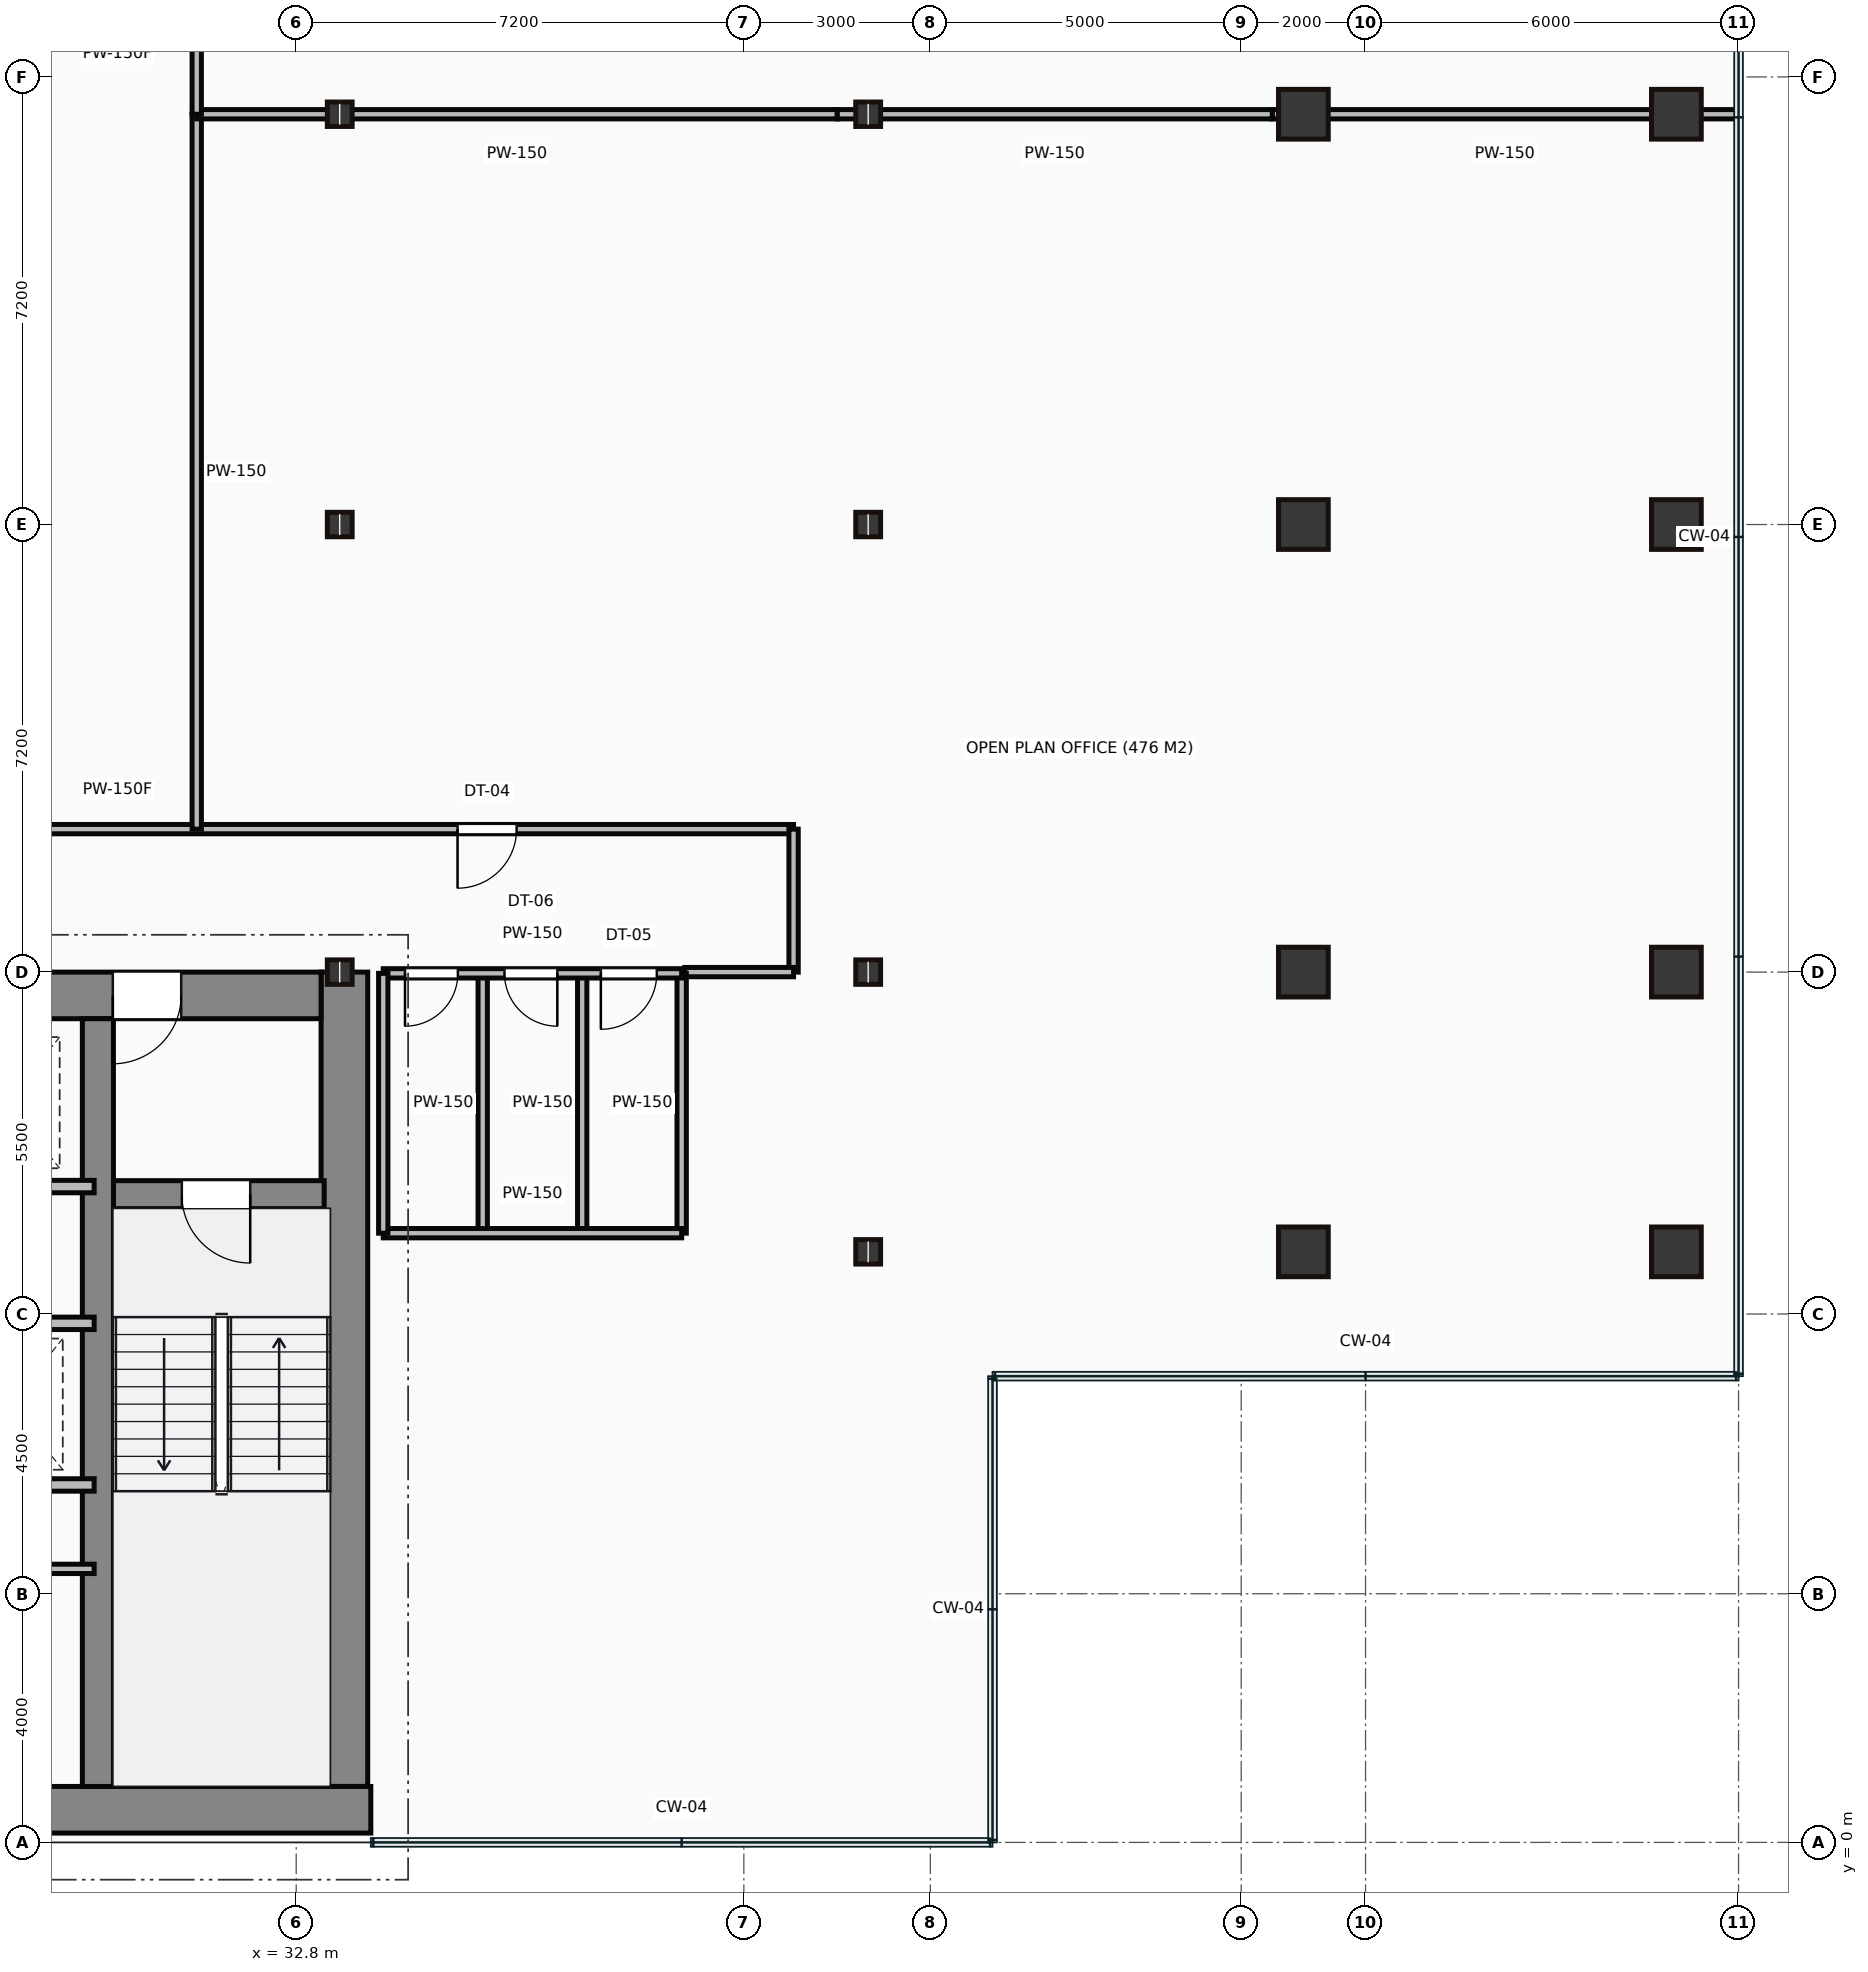
"""IFC4 building model, lengths in metres.
Left out: names, types, materials, properties, quantities, classifications, styles, units other than length and angle.
Written with IfcOpenShell. Run it as: python <this file> out.ifc"""

import sys

from ifc_helpers import new_model, si_unit, direction, frame, frame_2d, origin, origin_2d, place, context, subcontext, project, spatial, rectangle, hollow_rectangle, i_section, extrude, source, transform, mapped, element, fill, save


model = new_model("IFC4")
c1 = context("Model", 3, precision=1e-05, world=origin(), true_north=direction((0.0, 1.0)))
c2 = subcontext(c1, "Body", "Model", "MODEL_VIEW")
j1 = project(units=[si_unit("LENGTHUNIT", "METRE"), si_unit("PLANEANGLEUNIT", "RADIAN")], contexts=[c1])
p1 = place(None, origin())
s1 = spatial("IfcSite", under=j1, at=p1, CompositionType="ELEMENT")
p2 = place(p1, origin())
s2 = spatial("IfcBuilding", under=s1, at=p2, CompositionType="ELEMENT")
p3 = place(p2, frame((0.0, 0.0, 92.3)))
s3 = spatial("IfcBuildingStorey", under=s2, at=p3, CompositionType="ELEMENT", Elevation=92.3)
m1 = source(origin(), c2, "Body", "SweptSolid", [
    extrude(rectangle(XDim=29.5, YDim=0.75, at=frame_2d((14.75, 0.0))), origin(), (0.0, 0.0, 1.0), 3.65),
])
p4 = place(p3, frame((4.5, 0.525, 0.0), z_axis=(0.0, 0.0, 1.0), x_axis=(1.0, 0.0, 0.0)))
e1 = element("IfcWall", 1, at=p4, inside=s3, PredefinedType="SHEAR", context=c2, shape_type="MappedRepresentation", body=[
    mapped(m1, transform((0.0, 0.0, 0.0))),
])
m2 = source(origin(), c2, "Body", "SweptSolid", [
    extrude(rectangle(XDim=13.1, YDim=0.75, at=frame_2d((6.55, 0.0))), origin(), (0.0, 0.0, 1.0), 3.65),
])
p5 = place(p3, frame((33.575, 0.9, 0.0), z_axis=(0.0, 0.0, 1.0), x_axis=(0.0, 1.0, 0.0)))
e2 = element("IfcWall", 2, at=p5, inside=s3, PredefinedType="SHEAR", context=c2, shape_type="MappedRepresentation", body=[
    mapped(m2, transform((0.0, 0.0, 0.0))),
])
m3 = source(origin(), c2, "Body", "SweptSolid", [
    extrude(rectangle(XDim=12.6, YDim=0.75, at=frame_2d((6.3, 0.0))), origin(), (0.0, 0.0, 1.0), 3.65),
])
p6 = place(p3, frame((20.6, 13.625, 0.0), z_axis=(0.0, 0.0, 1.0), x_axis=(1.0, 0.0, 0.0)))
e3 = element("IfcWall", 3, at=p6, inside=s3, PredefinedType="SHEAR", context=c2, shape_type="MappedRepresentation", body=[
    mapped(m3, transform((0.0, 0.0, 0.0))),
])
p7 = place(p6, frame((9.25, 0.0, 0.0)))
e4 = element("IfcOpeningElement", 4, at=p7, cuts=e3, PredefinedType="OPENING", context=c2, shape_type="SweptSolid", body=[
    extrude(rectangle(XDim=1.1, YDim=2.15, at=frame_2d((0.55, 1.075))), frame((0.0, 0.385, 0.0), z_axis=(0.0, -1.0, 0.0), x_axis=(1.0, 0.0, 0.0)), (0.0, 0.0, 1.0), 0.77),
])
m4 = source(origin(), c2, "Body", "SweptSolid", [
    extrude(rectangle(XDim=12.35, YDim=0.5, at=frame_2d((6.175, 0.0))), origin(), (0.0, 0.0, 1.0), 3.65),
])
p8 = place(p3, frame((29.61, 0.9, 0.0), z_axis=(0.0, 0.0, 1.0), x_axis=(0.0, 1.0, 0.0)))
e5 = element("IfcWall", 5, at=p8, inside=s3, PredefinedType="SHEAR", context=c2, shape_type="MappedRepresentation", body=[
    mapped(m4, transform((0.0, 0.0, 0.0))),
])
m5 = source(origin(), c2, "Body", "SweptSolid", [
    extrude(rectangle(XDim=3.39, YDim=0.45, at=frame_2d((1.695, 0.0))), origin(), (0.0, 0.0, 1.0), 3.65),
])
p9 = place(p3, frame((29.86, 10.42, 0.0), z_axis=(0.0, 0.0, 1.0), x_axis=(1.0, 0.0, 0.0)))
e6 = element("IfcWall", 6, at=p9, inside=s3, PredefinedType="SHEAR", context=c2, shape_type="MappedRepresentation", body=[
    mapped(m5, transform((0.0, 0.0, 0.0))),
])
p10 = place(p9, frame((1.1, 0.0, 0.0)))
e7 = element("IfcOpeningElement", 7, at=p10, cuts=e6, PredefinedType="OPENING", context=c2, shape_type="SweptSolid", body=[
    extrude(rectangle(XDim=1.1, YDim=2.15, at=frame_2d((0.55, 1.075))), frame((0.0, 0.235, 0.0), z_axis=(0.0, -1.0, 0.0), x_axis=(1.0, 0.0, 0.0)), (0.0, 0.0, 1.0), 0.47),
])
m6 = source(origin(), c2, "Body", "SweptSolid", [
    extrude(i_section(OverallWidth=0.399, OverallDepth=0.393, WebThickness=0.023, FlangeThickness=0.037, at=origin_2d()), origin(), (0.0, 0.0, 1.0), 3.65),
])
for number, where, z_axis, x_axis in (
    (8, (33.5, 14.0, 0.0), (0.0, 0.0, 1.0), (1.0, 0.0, 0.0)),
    (9, (33.5, 21.2, 0.0), (0.0, 0.0, 1.0), (1.0, 0.0, 0.0)),
    (10, (33.5, 27.8, 0.0), (0.0, 0.0, 1.0), (1.0, 0.0, 0.0)),
    (11, (42.0, 9.5, 0.0), (0.0, 0.0, 1.0), (1.0, 0.0, 0.0)),
    (12, (42.0, 14.0, 0.0), (0.0, 0.0, 1.0), (1.0, 0.0, 0.0)),
    (13, (42.0, 21.2, 0.0), (0.0, 0.0, 1.0), (1.0, 0.0, 0.0)),
    (14, (42.0, 27.8, 0.0), (0.0, 0.0, 1.0), (1.0, 0.0, 0.0)),
):
    element("IfcColumn", number, at=place(p3, frame(where, z_axis=z_axis, x_axis=x_axis)), inside=s3, PredefinedType="COLUMN", context=c2, shape_type="MappedRepresentation", body=[
        mapped(m6, transform((0.0, 0.0, 0.0))),
    ])
m7 = source(origin(), c2, "Body", "SweptSolid", [
    extrude(hollow_rectangle(XDim=0.8, YDim=0.8, WallThickness=0.04, at=origin_2d()), origin(), (0.0, 0.0, 1.0), 3.65),
])
for number, where, z_axis, x_axis in (
    (15, (49.0, 9.5, 0.0), (0.0, 0.0, 1.0), (1.0, 0.0, 0.0)),
    (16, (49.0, 14.0, 0.0), (0.0, 0.0, 1.0), (1.0, 0.0, 0.0)),
    (17, (49.0, 21.2, 0.0), (0.0, 0.0, 1.0), (1.0, 0.0, 0.0)),
    (18, (49.0, 27.8, 0.0), (0.0, 0.0, 1.0), (1.0, 0.0, 0.0)),
    (19, (55.0, 9.5, 0.0), (0.0, 0.0, 1.0), (1.0, 0.0, 0.0)),
    (20, (55.0, 14.0, 0.0), (0.0, 0.0, 1.0), (1.0, 0.0, 0.0)),
    (21, (55.0, 21.2, 0.0), (0.0, 0.0, 1.0), (1.0, 0.0, 0.0)),
    (22, (55.0, 27.8, 0.0), (0.0, 0.0, 1.0), (1.0, 0.0, 0.0)),
):
    element("IfcColumn", number, at=place(p3, frame(where, z_axis=z_axis, x_axis=x_axis)), inside=s3, PredefinedType="COLUMN", context=c2, shape_type="MappedRepresentation", body=[
        mapped(m7, transform((0.0, 0.0, 0.0))),
    ])
m8 = source(origin(), c2, "Body", "SweptSolid", [
    extrude(rectangle(XDim=8.8, YDim=0.2, at=frame_2d((4.4, 0.0))), origin(), (0.0, 0.0, 1.0), 3.4),
])
p11 = place(p3, frame((20.75, 10.55, 0.0), z_axis=(0.0, 0.0, 1.0), x_axis=(1.0, 0.0, 0.0)))
e23 = element("IfcWall", 23, at=p11, inside=s3, PredefinedType="PARTITIONING", context=c2, shape_type="MappedRepresentation", body=[
    mapped(m8, transform((0.0, 0.0, 0.0))),
])
m9 = source(origin(), c2, "Body", "SweptSolid", [
    extrude(rectangle(XDim=4.55, YDim=0.2, at=frame_2d((2.275, 0.0))), origin(), (0.0, 0.0, 1.0), 3.4),
])
for number, where, z_axis, x_axis in (
    (24, (25.0, 8.35, 0.0), (0.0, 0.0, 1.0), (1.0, 0.0, 0.0)),
    (25, (25.0, 5.75, 0.0), (0.0, 0.0, 1.0), (1.0, 0.0, 0.0)),
):
    element("IfcWall", number, at=place(p3, frame(where, z_axis=z_axis, x_axis=x_axis)), inside=s3, PredefinedType="PARTITIONING", context=c2, shape_type="MappedRepresentation", body=[
        mapped(m9, transform((0.0, 0.0, 0.0))),
    ])
m10 = source(origin(), c2, "Body", "SweptSolid", [
    extrude(rectangle(XDim=4.55, YDim=0.15, at=frame_2d((2.275, 0.0))), origin(), (0.0, 0.0, 1.0), 3.4),
])
p12 = place(p3, frame((25.0, 4.4, 0.0), z_axis=(0.0, 0.0, 1.0), x_axis=(1.0, 0.0, 0.0)))
e26 = element("IfcWall", 26, at=p12, inside=s3, PredefinedType="PARTITIONING", context=c2, shape_type="MappedRepresentation", body=[
    mapped(m10, transform((0.0, 0.0, 0.0))),
])
m11 = source(origin(), c2, "Body", "SweptSolid", [
    extrude(rectangle(XDim=4.8, YDim=0.15, at=frame_2d((2.4, 0.0))), origin(), (0.0, 0.0, 1.0), 2.702),
])
p13 = place(p3, frame((34.2, 13.98, 0.0), z_axis=(0.0, 0.0, 1.0), x_axis=(1.0, 0.0, 0.0)))
e27 = element("IfcWall", 27, at=p13, inside=s3, PredefinedType="PARTITIONING", context=c2, shape_type="MappedRepresentation", body=[
    mapped(m11, transform((0.0, 0.0, 0.0))),
])
p14 = place(p13, frame((0.35, 0.0, 0.0)))
e28 = element("IfcOpeningElement", 28, at=p14, cuts=e27, PredefinedType="OPENING", context=c2, shape_type="SweptSolid", body=[
    extrude(rectangle(XDim=0.85, YDim=2.1, at=frame_2d((0.425, 1.05))), frame((0.0, 0.085, 0.0), z_axis=(0.0, -1.0, 0.0), x_axis=(1.0, 0.0, 0.0)), (0.0, 0.0, 1.0), 0.17),
])
p15 = place(p13, frame((1.95, 0.0, 0.0)))
e29 = element("IfcOpeningElement", 29, at=p15, cuts=e27, PredefinedType="OPENING", context=c2, shape_type="SweptSolid", body=[
    extrude(rectangle(XDim=0.85, YDim=2.1, at=frame_2d((0.425, 1.05))), frame((0.0, 0.085, 0.0), z_axis=(0.0, -1.0, 0.0), x_axis=(1.0, 0.0, 0.0)), (0.0, 0.0, 1.0), 0.17),
])
p16 = place(p13, frame((3.5, 0.0, 0.0)))
e30 = element("IfcOpeningElement", 30, at=p16, cuts=e27, PredefinedType="OPENING", context=c2, shape_type="SweptSolid", body=[
    extrude(rectangle(XDim=0.9, YDim=2.1, at=frame_2d((0.45, 1.05))), frame((0.0, 0.085, 0.0), z_axis=(0.0, -1.0, 0.0), x_axis=(1.0, 0.0, 0.0)), (0.0, 0.0, 1.0), 0.17),
])
m12 = source(origin(), c2, "Body", "SweptSolid", [
    extrude(rectangle(XDim=4.8, YDim=0.15, at=frame_2d((2.4, 0.0))), origin(), (0.0, 0.0, 1.0), 3.4),
])
p17 = place(p3, frame((34.2, 9.8, 0.0), z_axis=(0.0, 0.0, 1.0), x_axis=(1.0, 0.0, 0.0)))
e31 = element("IfcWall", 31, at=p17, inside=s3, PredefinedType="PARTITIONING", context=c2, shape_type="MappedRepresentation", body=[
    mapped(m12, transform((0.0, 0.0, 0.0))),
])
m13 = source(origin(), c2, "Body", "SweptSolid", [
    extrude(rectangle(XDim=4.18, YDim=0.15, at=frame_2d((2.09, 0.0))), origin(), (0.0, 0.0, 1.0), 3.4),
])
for number, where, z_axis, x_axis in (
    (32, (39.0, 9.8, 0.0), (0.0, 0.0, 1.0), (0.0, 1.0, 0.0)),
    (33, (34.2, 9.8, 0.0), (0.0, 0.0, 1.0), (0.0, 1.0, 0.0)),
    (34, (35.8, 9.8, 0.0), (0.0, 0.0, 1.0), (0.0, 1.0, 0.0)),
    (35, (37.4, 9.8, 0.0), (0.0, 0.0, 1.0), (0.0, 1.0, 0.0)),
):
    element("IfcWall", number, at=place(p3, frame(where, z_axis=z_axis, x_axis=x_axis)), inside=s3, PredefinedType="PARTITIONING", context=c2, shape_type="MappedRepresentation", body=[
        mapped(m13, transform((0.0, 0.0, 0.0))),
    ])
m14 = source(origin(), c2, "Body", "SweptSolid", [
    extrude(rectangle(XDim=21.75, YDim=0.15, at=frame_2d((10.875, 0.0))), origin(), (0.0, 0.0, 1.0), 3.4),
])
p18 = place(p3, frame((19.05, 16.3, 0.0), z_axis=(0.0, 0.0, 1.0), x_axis=(1.0, 0.0, 0.0)))
e36 = element("IfcWall", 36, at=p18, inside=s3, PredefinedType="PARTITIONING", context=c2, shape_type="MappedRepresentation", body=[
    mapped(m14, transform((0.0, 0.0, 0.0))),
])
p19 = place(p18, frame((16.345, 0.0, 0.0)))
e37 = element("IfcOpeningElement", 37, at=p19, cuts=e36, PredefinedType="OPENING", context=c2, shape_type="SweptSolid", body=[
    extrude(rectangle(XDim=0.95, YDim=2.15, at=frame_2d((0.475, 1.075))), frame((0.0, 0.085, 0.0), z_axis=(0.0, -1.0, 0.0), x_axis=(1.0, 0.0, 0.0)), (0.0, 0.0, 1.0), 0.17),
])
m15 = source(origin(), c2, "Body", "SweptSolid", [
    extrude(rectangle(XDim=2.3, YDim=0.15, at=frame_2d((1.15, 0.0))), origin(), (0.0, 0.0, 1.0), 3.4),
])
p20 = place(p3, frame((40.8, 16.3, 0.0), z_axis=(0.0, 0.0, 1.0), x_axis=(0.0, -1.0, 0.0)))
e38 = element("IfcWall", 38, at=p20, inside=s3, PredefinedType="PARTITIONING", context=c2, shape_type="MappedRepresentation", body=[
    mapped(m15, transform((0.0, 0.0, 0.0))),
])
m16 = source(origin(), c2, "Body", "SweptSolid", [
    extrude(rectangle(XDim=1.75, YDim=0.15, at=frame_2d((0.875, 0.0))), origin(), (0.0, 0.0, 1.0), 2.702),
])
p21 = place(p3, frame((40.8, 14.0, 0.0), z_axis=(0.0, 0.0, 1.0), x_axis=(-1.0, 0.0, 0.0)))
e39 = element("IfcWall", 39, at=p21, inside=s3, PredefinedType="PARTITIONING", context=c2, shape_type="MappedRepresentation", body=[
    mapped(m16, transform((0.0, 0.0, 0.0))),
])
m17 = source(origin(), c2, "Body", "SweptSolid", [
    extrude(rectangle(XDim=11.5, YDim=0.15, at=frame_2d((5.75, 0.0))), origin(), (0.0, 0.0, 1.0), 3.4),
])
p22 = place(p3, frame((31.2, 27.8, 0.0), z_axis=(0.0, 0.0, 1.0), x_axis=(0.0, -1.0, 0.0)))
e40 = element("IfcWall", 40, at=p22, inside=s3, PredefinedType="PARTITIONING", context=c2, shape_type="MappedRepresentation", body=[
    mapped(m17, transform((0.0, 0.0, 0.0))),
])
m18 = source(origin(), c2, "Body", "SweptSolid", [
    extrude(rectangle(XDim=7.48, YDim=0.15, at=frame_2d((3.74, 0.0))), origin(), (0.0, 0.0, 1.0), 2.702),
])
p23 = place(p3, frame((55.98, 27.8, 0.0), z_axis=(0.0, 0.0, 1.0), x_axis=(-1.0, 0.0, 0.0)))
e41 = element("IfcWall", 41, at=p23, inside=s3, PredefinedType="PARTITIONING", context=c2, shape_type="MappedRepresentation", body=[
    mapped(m18, transform((0.0, 0.0, 0.0))),
])
m19 = source(origin(), c2, "Body", "SweptSolid", [
    extrude(rectangle(XDim=7.0, YDim=0.15, at=frame_2d((3.5, 0.0))), origin(), (0.0, 0.0, 1.0), 2.702),
])
p24 = place(p3, frame((48.5, 27.8, 0.0), z_axis=(0.0, 0.0, 1.0), x_axis=(-1.0, 0.0, 0.0)))
e42 = element("IfcWall", 42, at=p24, inside=s3, PredefinedType="PARTITIONING", context=c2, shape_type="MappedRepresentation", body=[
    mapped(m19, transform((0.0, 0.0, 0.0))),
])
m20 = source(origin(), c2, "Body", "SweptSolid", [
    extrude(rectangle(XDim=10.3, YDim=0.15, at=frame_2d((5.15, 0.0))), origin(), (0.0, 0.0, 1.0), 2.702),
])
p25 = place(p3, frame((41.5, 27.8, 0.0), z_axis=(0.0, 0.0, 1.0), x_axis=(-1.0, 0.0, 0.0)))
e43 = element("IfcWall", 43, at=p25, inside=s3, PredefinedType="PARTITIONING", context=c2, shape_type="MappedRepresentation", body=[
    mapped(m20, transform((0.0, 0.0, 0.0))),
])
m21 = source(origin(), c2, "Body", "SweptSolid", [
    extrude(rectangle(XDim=1.6, YDim=0.15, at=frame_2d((0.8, 0.0))), origin(), (0.0, 0.0, 1.0), 3.4),
])
p26 = place(p3, frame((31.2, 29.4, 0.0), z_axis=(0.0, 0.0, 1.0), x_axis=(0.0, -1.0, 0.0)))
e44 = element("IfcWall", 44, at=p26, inside=s3, PredefinedType="PARTITIONING", context=c2, shape_type="MappedRepresentation", body=[
    mapped(m21, transform((0.0, 0.0, 0.0))),
])
m22 = source(origin(), c2, "Body", "SweptSolid", [
    extrude(rectangle(XDim=1.1, YDim=2.15, at=frame_2d((0.55, 1.075))), frame((0.0, 0.025, 0.0), z_axis=(0.0, -1.0, 0.0), x_axis=(1.0, 0.0, 0.0)), (0.0, 0.0, 1.0), 0.05),
])
p27 = place(p10, frame((1.1, 0.0, 0.0), z_axis=(0.0, 0.0, 1.0), x_axis=(-1.0, 0.0, 0.0)))
e45 = element("IfcDoor", 45, at=p27, inside=s3, OperationType="SINGLE_SWING_RIGHT", PredefinedType="DOOR", context=c2, shape_type="MappedRepresentation", body=[
    mapped(m22, transform((0.0, 0.0, 0.0))),
])
fill(e7, e45)
p28 = place(p7, origin())
e46 = element("IfcDoor", 46, at=p28, inside=s3, OperationType="SINGLE_SWING_LEFT", PredefinedType="DOOR", context=c2, shape_type="MappedRepresentation", body=[
    mapped(m22, transform((0.0, 0.0, 0.0))),
])
fill(e4, e46)
m23 = source(origin(), c2, "Body", "SweptSolid", [
    extrude(rectangle(XDim=0.85, YDim=2.1, at=frame_2d((0.425, 1.05))), frame((0.0, 0.025, 0.0), z_axis=(0.0, -1.0, 0.0), x_axis=(1.0, 0.0, 0.0)), (0.0, 0.0, 1.0), 0.05),
])
p29 = place(p14, frame((0.85, 0.0, 0.0), z_axis=(0.0, 0.0, 1.0), x_axis=(-1.0, 0.0, 0.0)))
e47 = element("IfcDoor", 47, at=p29, inside=s3, OperationType="SINGLE_SWING_LEFT", PredefinedType="DOOR", context=c2, shape_type="MappedRepresentation", body=[
    mapped(m23, transform((0.0, 0.0, 0.0))),
])
fill(e28, e47)
p30 = place(p15, frame((0.85, 0.0, 0.0), z_axis=(0.0, 0.0, 1.0), x_axis=(-1.0, 0.0, 0.0)))
e48 = element("IfcDoor", 48, at=p30, inside=s3, OperationType="SINGLE_SWING_RIGHT", PredefinedType="DOOR", context=c2, shape_type="MappedRepresentation", body=[
    mapped(m23, transform((0.0, 0.0, 0.0))),
])
fill(e29, e48)
m24 = source(origin(), c2, "Body", "SweptSolid", [
    extrude(rectangle(XDim=0.9, YDim=2.1, at=frame_2d((0.45, 1.05))), frame((0.0, 0.025, 0.0), z_axis=(0.0, -1.0, 0.0), x_axis=(1.0, 0.0, 0.0)), (0.0, 0.0, 1.0), 0.05),
])
p31 = place(p16, frame((0.9, 0.0, 0.0), z_axis=(0.0, 0.0, 1.0), x_axis=(-1.0, 0.0, 0.0)))
e49 = element("IfcDoor", 49, at=p31, inside=s3, OperationType="SINGLE_SWING_LEFT", PredefinedType="DOOR", context=c2, shape_type="MappedRepresentation", body=[
    mapped(m24, transform((0.0, 0.0, 0.0))),
])
fill(e30, e49)
m25 = source(origin(), c2, "Body", "SweptSolid", [
    extrude(rectangle(XDim=0.95, YDim=2.15, at=frame_2d((0.475, 1.075))), frame((0.0, 0.025, 0.0), z_axis=(0.0, -1.0, 0.0), x_axis=(1.0, 0.0, 0.0)), (0.0, 0.0, 1.0), 0.05),
])
p32 = place(p19, origin())
e50 = element("IfcDoor", 50, at=p32, inside=s3, OperationType="SINGLE_SWING_LEFT", PredefinedType="DOOR", context=c2, shape_type="MappedRepresentation", body=[
    mapped(m25, transform((0.0, 0.0, 0.0))),
])
fill(e37, e50)
save(model, sys.argv[1])
